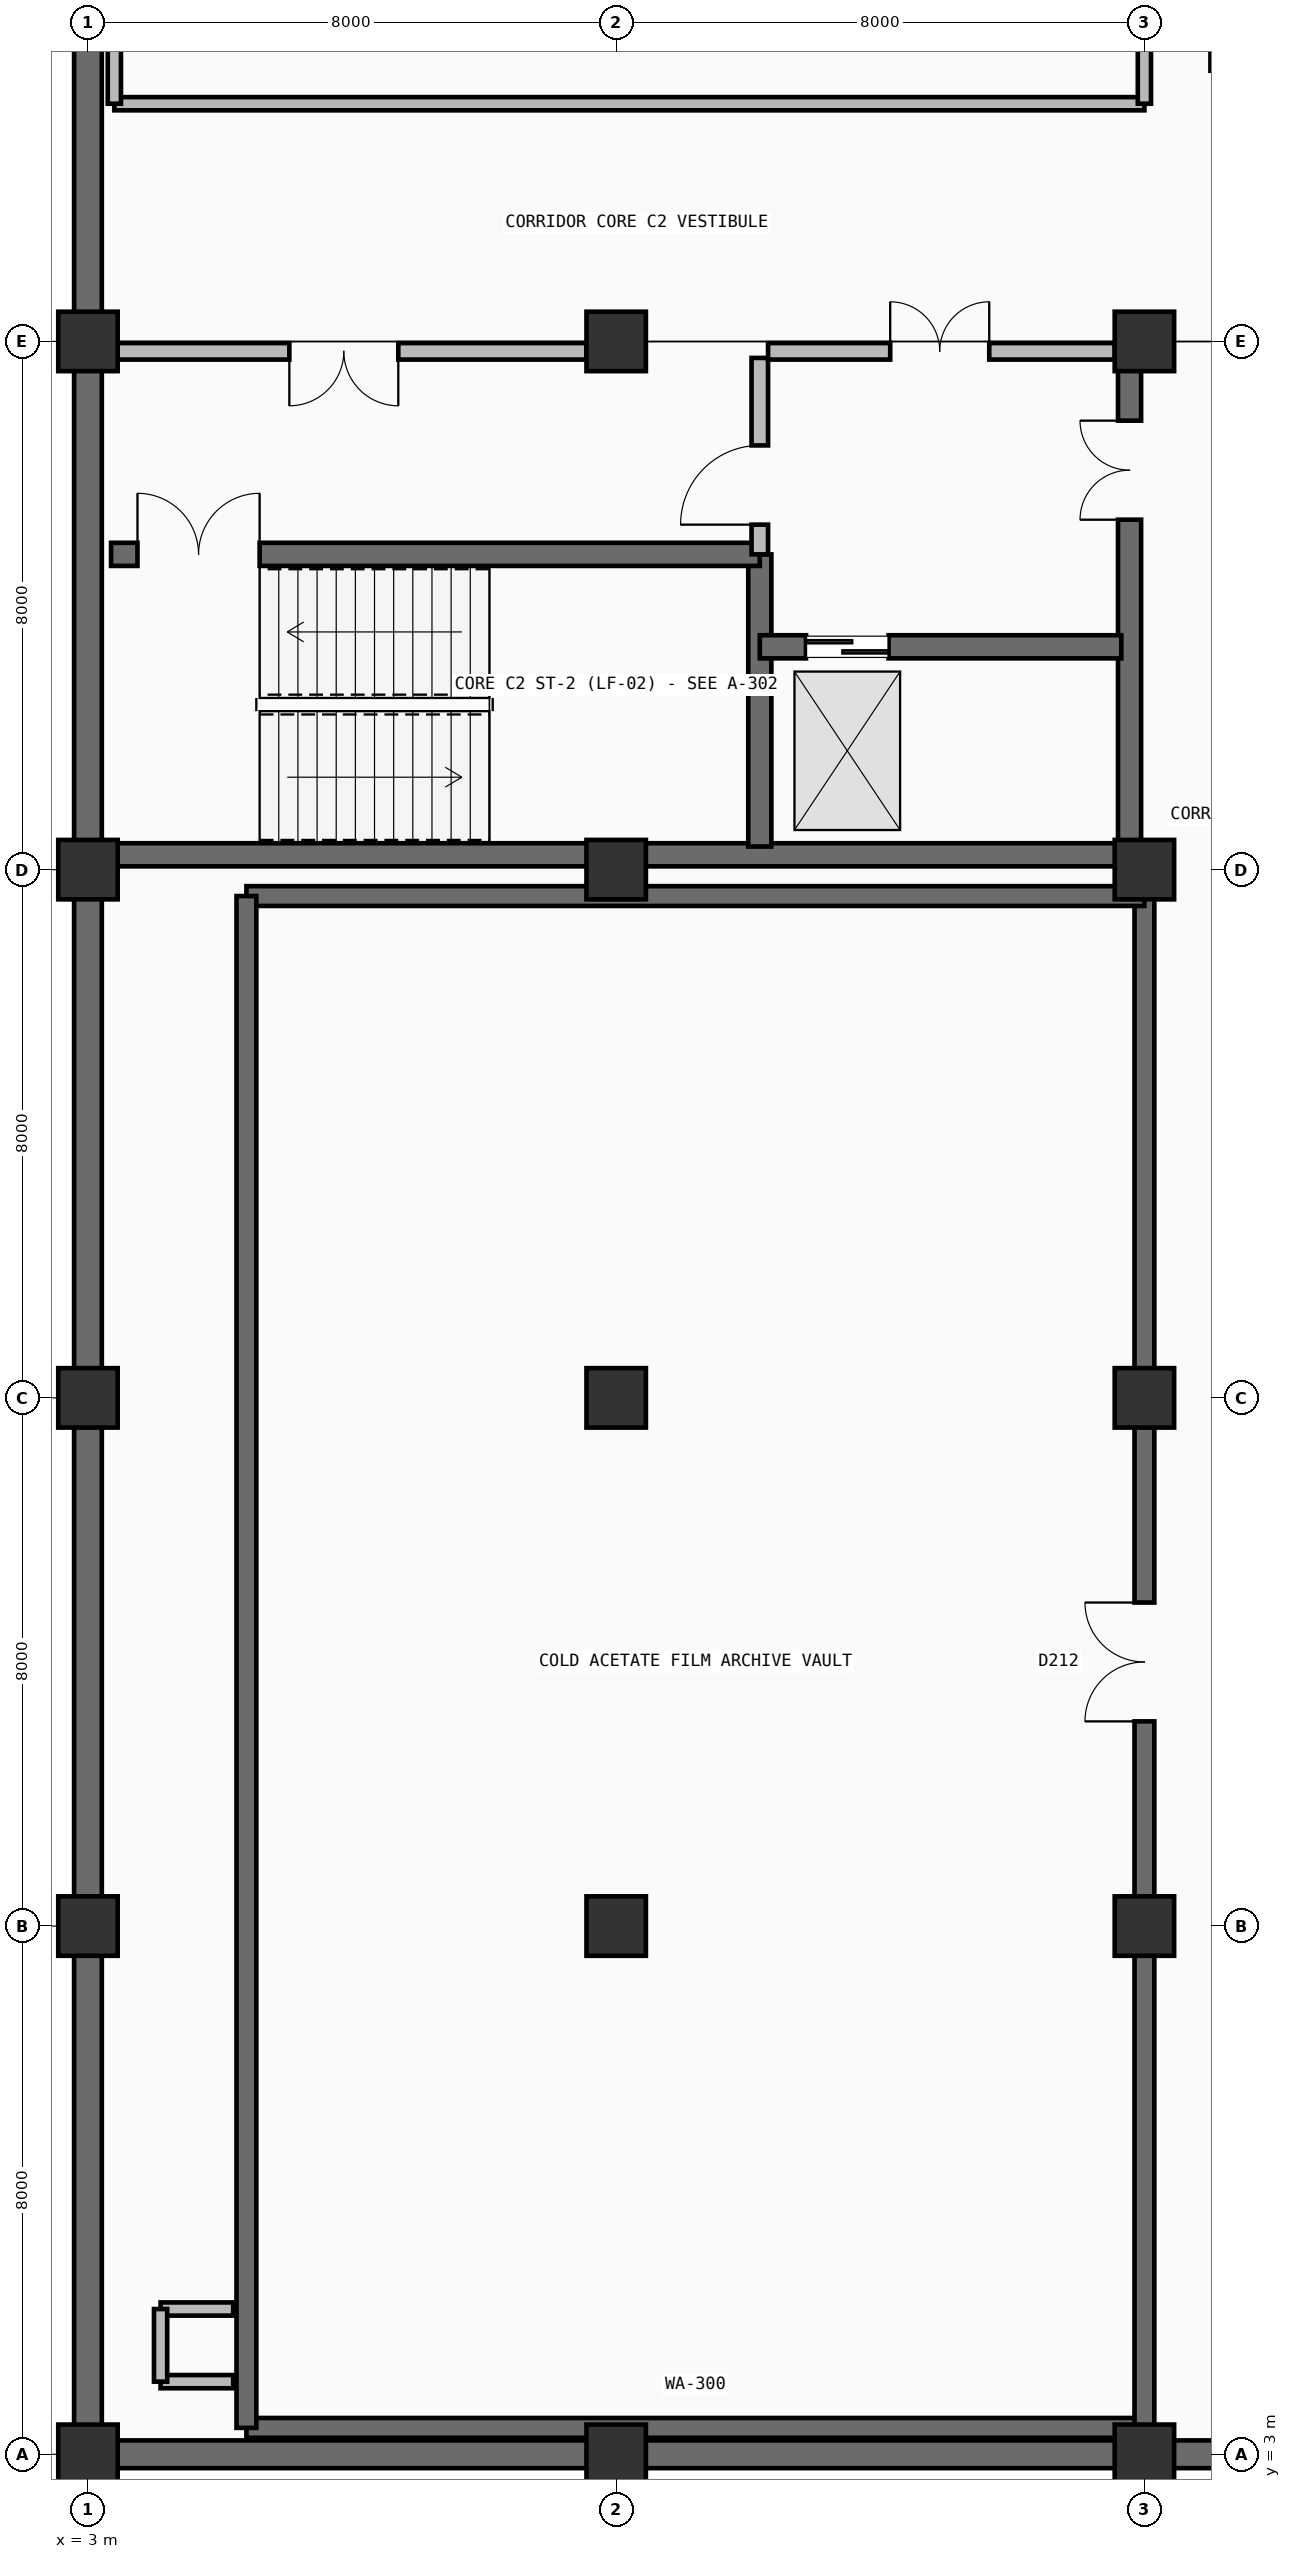
"""IFC4 building model, lengths in metres.
Left out: names, types, materials, properties, quantities, classifications, styles, units other than length and angle.
Written with IfcOpenShell. Run it as: python <this file> out.ifc"""

import sys

from ifc_helpers import new_model, si_unit, direction, frame, frame_2d, origin, origin_2d, place, context, subcontext, project, spatial, rectangle, extrude, element, fill, save


model = new_model("IFC4")
c1 = context("Model", 3, precision=1e-05, world=origin(), true_north=direction((0.0, 1.0)))
c2 = subcontext(c1, "Body", "Model", "MODEL_VIEW")
j1 = project(units=[si_unit("LENGTHUNIT", "METRE"), si_unit("PLANEANGLEUNIT", "RADIAN")], contexts=[c1])
p1 = place(None, origin())
s1 = spatial("IfcSite", under=j1, at=p1, CompositionType="ELEMENT")
p2 = place(p1, origin())
s2 = spatial("IfcBuilding", under=s1, at=p2, CompositionType="ELEMENT")
p3 = place(p2, frame((0.0, 0.0, -4.5)))
s3 = spatial("IfcBuildingStorey", under=s2, at=p3, CompositionType="ELEMENT", Elevation=-4.5)
for number, where, z_axis, x_axis in (
    (1, (3.0, 3.0, -0.6), (0.0, 0.0, 1.0), (1.0, 0.0, 0.0)),
    (2, (3.0, 11.0, -0.6), (0.0, 0.0, 1.0), (1.0, 0.0, 0.0)),
    (3, (3.0, 19.0, -0.6), (0.0, 0.0, 1.0), (1.0, 0.0, 0.0)),
    (4, (3.0, 27.0, -0.6), (0.0, 0.0, 1.0), (1.0, 0.0, 0.0)),
    (5, (3.0, 35.0, -0.6), (0.0, 0.0, 1.0), (1.0, 0.0, 0.0)),
    (6, (11.0, 3.0, -0.6), (0.0, 0.0, 1.0), (1.0, 0.0, 0.0)),
    (7, (11.0, 11.0, -0.6), (0.0, 0.0, 1.0), (1.0, 0.0, 0.0)),
    (8, (11.0, 19.0, -0.6), (0.0, 0.0, 1.0), (1.0, 0.0, 0.0)),
    (9, (11.0, 27.0, -0.6), (0.0, 0.0, 1.0), (1.0, 0.0, 0.0)),
    (10, (11.0, 35.0, -0.6), (0.0, 0.0, 1.0), (1.0, 0.0, 0.0)),
    (11, (19.0, 3.0, -0.6), (0.0, 0.0, 1.0), (1.0, 0.0, 0.0)),
    (12, (19.0, 11.0, -0.6), (0.0, 0.0, 1.0), (1.0, 0.0, 0.0)),
    (13, (19.0, 19.0, -0.6), (0.0, 0.0, 1.0), (1.0, 0.0, 0.0)),
    (14, (19.0, 27.0, -0.6), (0.0, 0.0, 1.0), (1.0, 0.0, 0.0)),
    (15, (19.0, 35.0, -0.6), (0.0, 0.0, 1.0), (1.0, 0.0, 0.0)),
):
    element("IfcColumn", number, at=place(p3, frame(where, z_axis=z_axis, x_axis=x_axis)), inside=s3, PredefinedType="COLUMN", context=c2, shape_type="SweptSolid", body=[
        extrude(rectangle(XDim=0.9, YDim=0.9, at=origin_2d()), origin(), (0.0, 0.0, 1.0), 5.1),
    ])
for number, where, z_axis, x_axis in (
    (16, (27.0, 3.0, 0.0), (0.0, 0.0, 1.0), (-1.0, 0.0, 0.0)),
    (17, (19.0, 3.0, 0.0), (0.0, 0.0, 1.0), (-1.0, 0.0, 0.0)),
    (18, (11.0, 3.0, 0.0), (0.0, 0.0, 1.0), (-1.0, 0.0, 0.0)),
    (19, (3.0, 3.0, 0.0), (0.0, 0.0, 1.0), (0.0, 1.0, 0.0)),
    (20, (3.0, 11.0, 0.0), (0.0, 0.0, 1.0), (0.0, 1.0, 0.0)),
    (21, (3.0, 19.0, 0.0), (0.0, 0.0, 1.0), (0.0, 1.0, 0.0)),
    (22, (3.0, 27.0, 0.0), (0.0, 0.0, 1.0), (0.0, 1.0, 0.0)),
    (23, (3.0, 35.0, 0.0), (0.0, 0.0, 1.0), (0.0, 1.0, 0.0)),
):
    element("IfcWall", number, at=place(p3, frame(where, z_axis=z_axis, x_axis=x_axis)), inside=s3, PredefinedType="USERDEFINED", context=c2, shape_type="SweptSolid", body=[
        extrude(rectangle(XDim=8.0, YDim=0.42, at=frame_2d((4.0, 0.0))), origin(), (0.0, 0.0, 1.0), 4.5),
    ])
p4 = place(p3, frame((3.2, 27.225, 0.0), z_axis=(0.0, 0.0, 1.0), x_axis=(1.0, 0.0, 0.0)))
e24 = element("IfcWall", 24, at=p4, inside=s3, PredefinedType="SHEAR", context=c2, shape_type="SweptSolid", body=[
    extrude(rectangle(XDim=15.6, YDim=0.35, at=frame_2d((7.8, 0.0))), origin(), (0.0, 0.0, 1.0), 4.2),
])
p5 = place(p3, frame((13.175, 27.35, 0.0), z_axis=(0.0, 0.0, 1.0), x_axis=(0.0, 1.0, 0.0)))
e25 = element("IfcWall", 25, at=p5, inside=s3, PredefinedType="SHEAR", context=c2, shape_type="SweptSolid", body=[
    extrude(rectangle(XDim=4.425, YDim=0.35, at=frame_2d((2.212, 0.0))), origin(), (0.0, 0.0, 1.0), 4.2),
])
p6 = place(p3, frame((18.775, 27.2, 0.0), z_axis=(0.0, 0.0, 1.0), x_axis=(0.0, 1.0, 0.0)))
e26 = element("IfcWall", 26, at=p6, inside=s3, PredefinedType="SHEAR", context=c2, shape_type="SweptSolid", body=[
    extrude(rectangle(XDim=7.6, YDim=0.35, at=frame_2d((3.8, 0.0))), origin(), (0.0, 0.0, 1.0), 4.2),
])
p7 = place(p6, frame((5.1, 0.0, 0.0)))
e27 = element("IfcOpeningElement", 27, at=p7, cuts=e26, PredefinedType="OPENING", context=c2, shape_type="SweptSolid", body=[
    extrude(rectangle(XDim=1.5, YDim=2.2, at=frame_2d((0.75, 1.1))), frame((0.0, 0.185, 0.0), z_axis=(0.0, -1.0, 0.0), x_axis=(1.0, 0.0, 0.0)), (0.0, 0.0, 1.0), 0.37),
])
p8 = place(p3, frame((3.35, 31.775, 0.0), z_axis=(0.0, 0.0, 1.0), x_axis=(1.0, 0.0, 0.0)))
e28 = element("IfcWall", 28, at=p8, inside=s3, PredefinedType="SHEAR", context=c2, shape_type="SweptSolid", body=[
    extrude(rectangle(XDim=9.825, YDim=0.35, at=frame_2d((4.913, 0.0))), origin(), (0.0, 0.0, 1.0), 4.2),
])
p9 = place(p8, frame((0.4, 0.0, 0.0)))
e29 = element("IfcOpeningElement", 29, at=p9, cuts=e28, PredefinedType="OPENING", context=c2, shape_type="SweptSolid", body=[
    extrude(rectangle(XDim=1.85, YDim=2.25, at=frame_2d((0.925, 1.125))), frame((0.0, 0.185, 0.0), z_axis=(0.0, -1.0, 0.0), x_axis=(1.0, 0.0, 0.0)), (0.0, 0.0, 1.0), 0.37),
])
p10 = place(p3, frame((13.175, 30.375, 0.0), z_axis=(0.0, 0.0, 1.0), x_axis=(1.0, 0.0, 0.0)))
e30 = element("IfcWall", 30, at=p10, inside=s3, PredefinedType="SHEAR", context=c2, shape_type="SweptSolid", body=[
    extrude(rectangle(XDim=5.475, YDim=0.35, at=frame_2d((2.737, 0.0))), origin(), (0.0, 0.0, 1.0), 4.2),
])
p11 = place(p10, frame((0.7, 0.0, 0.0)))
e31 = element("IfcOpeningElement", 31, at=p11, cuts=e30, PredefinedType="OPENING", context=c2, shape_type="SweptSolid", body=[
    extrude(rectangle(XDim=1.25, YDim=2.25, at=frame_2d((0.625, 1.125))), frame((0.0, 0.185, 0.0), z_axis=(0.0, -1.0, 0.0), x_axis=(1.0, 0.0, 0.0)), (0.0, 0.0, 1.0), 0.37),
])
p12 = place(p3, frame((13.175, 31.775, 0.0), z_axis=(0.0, 0.0, 1.0), x_axis=(0.0, 1.0, 0.0)))
e32 = element("IfcWall", 32, at=p12, inside=s3, PredefinedType="PARTITIONING", context=c2, shape_type="SweptSolid", body=[
    extrude(rectangle(XDim=2.975, YDim=0.25, at=frame_2d((1.488, 0.0))), origin(), (0.0, 0.0, 1.0), 4.2),
])
p13 = place(p12, frame((0.45, 0.0, 0.0)))
e33 = element("IfcOpeningElement", 33, at=p13, cuts=e32, PredefinedType="OPENING", context=c2, shape_type="SweptSolid", body=[
    extrude(rectangle(XDim=1.2, YDim=2.2, at=frame_2d((0.6, 1.1))), frame((0.0, 0.135, 0.0), z_axis=(0.0, -1.0, 0.0), x_axis=(1.0, 0.0, 0.0)), (0.0, 0.0, 1.0), 0.27),
])
p14 = place(p3, frame((3.45, 34.85, 0.0), z_axis=(0.0, 0.0, 1.0), x_axis=(1.0, 0.0, 0.0)))
e34 = element("IfcWall", 34, at=p14, inside=s3, PredefinedType="PARTITIONING", context=c2, shape_type="SweptSolid", body=[
    extrude(rectangle(XDim=7.1, YDim=0.25, at=frame_2d((3.55, 0.0))), origin(), (0.0, 0.0, 1.0), 3.435),
])
p15 = place(p14, frame((2.6, 0.0, 0.0)))
e35 = element("IfcOpeningElement", 35, at=p15, cuts=e34, PredefinedType="OPENING", context=c2, shape_type="SweptSolid", body=[
    extrude(rectangle(XDim=1.65, YDim=2.25, at=frame_2d((0.825, 1.125))), frame((0.0, 0.135, 0.0), z_axis=(0.0, -1.0, 0.0), x_axis=(1.0, 0.0, 0.0)), (0.0, 0.0, 1.0), 0.27),
])
p16 = place(p3, frame((13.3, 34.85, 0.0), z_axis=(0.0, 0.0, 1.0), x_axis=(1.0, 0.0, 0.0)))
e36 = element("IfcWall", 36, at=p16, inside=s3, PredefinedType="PARTITIONING", context=c2, shape_type="SweptSolid", body=[
    extrude(rectangle(XDim=5.25, YDim=0.25, at=frame_2d((2.625, 0.0))), origin(), (0.0, 0.0, 1.0), 3.435),
])
p17 = place(p16, frame((1.85, 0.0, 0.0)))
e37 = element("IfcOpeningElement", 37, at=p17, cuts=e36, PredefinedType="OPENING", context=c2, shape_type="SweptSolid", body=[
    extrude(rectangle(XDim=1.5, YDim=2.2, at=frame_2d((0.75, 1.1))), frame((0.0, 0.135, 0.0), z_axis=(0.0, -1.0, 0.0), x_axis=(1.0, 0.0, 0.0)), (0.0, 0.0, 1.0), 0.27),
])
p18 = place(p3, frame((5.4, 3.4, 0.0), z_axis=(0.0, 0.0, 1.0), x_axis=(1.0, 0.0, 0.0)))
e38 = element("IfcWall", 38, at=p18, inside=s3, PredefinedType="SHEAR", context=c2, shape_type="SweptSolid", body=[
    extrude(rectangle(XDim=13.6, YDim=0.3, at=frame_2d((6.8, 0.0))), origin(), (0.0, 0.0, 1.0), 4.2),
])
p19 = place(p3, frame((19.0, 3.4, 0.0), z_axis=(0.0, 0.0, 1.0), x_axis=(0.0, 1.0, 0.0)))
e39 = element("IfcWall", 39, at=p19, inside=s3, PredefinedType="SHEAR", context=c2, shape_type="SweptSolid", body=[
    extrude(rectangle(XDim=23.2, YDim=0.3, at=frame_2d((11.6, 0.0))), origin(), (0.0, 0.0, 1.0), 4.2),
])
p20 = place(p19, frame((10.7, 0.0, 0.0)))
e40 = element("IfcOpeningElement", 40, at=p20, cuts=e39, PredefinedType="OPENING", context=c2, shape_type="SweptSolid", body=[
    extrude(rectangle(XDim=1.8, YDim=2.3, at=frame_2d((0.9, 1.15))), frame((0.0, 0.16, 0.0), z_axis=(0.0, -1.0, 0.0), x_axis=(1.0, 0.0, 0.0)), (0.0, 0.0, 1.0), 0.32),
])
p21 = place(p3, frame((5.4, 26.6, 0.0), z_axis=(0.0, 0.0, 1.0), x_axis=(1.0, 0.0, 0.0)))
e41 = element("IfcWall", 41, at=p21, inside=s3, PredefinedType="SHEAR", context=c2, shape_type="SweptSolid", body=[
    extrude(rectangle(XDim=13.6, YDim=0.3, at=frame_2d((6.8, 0.0))), origin(), (0.0, 0.0, 1.0), 4.2),
])
p22 = place(p3, frame((5.4, 3.4, 0.0), z_axis=(0.0, 0.0, 1.0), x_axis=(0.0, 1.0, 0.0)))
e42 = element("IfcWall", 42, at=p22, inside=s3, PredefinedType="SHEAR", context=c2, shape_type="SweptSolid", body=[
    extrude(rectangle(XDim=23.2, YDim=0.3, at=frame_2d((11.6, 0.0))), origin(), (0.0, 0.0, 1.0), 4.2),
])
p23 = place(p3, frame((3.4, 38.6, 0.0), z_axis=(0.0, 0.0, 1.0), x_axis=(1.0, 0.0, 0.0)))
e43 = element("IfcWall", 43, at=p23, inside=s3, PredefinedType="PARTITIONING", context=c2, shape_type="SweptSolid", body=[
    extrude(rectangle(XDim=15.6, YDim=0.2, at=frame_2d((7.8, 0.0))), origin(), (0.0, 0.0, 1.0), 4.2),
])
p24 = place(p3, frame((19.0, 38.6, 0.0), z_axis=(0.0, 0.0, 1.0), x_axis=(0.0, 1.0, 0.0)))
e44 = element("IfcWall", 44, at=p24, inside=s3, PredefinedType="PARTITIONING", context=c2, shape_type="SweptSolid", body=[
    extrude(rectangle(XDim=25.0, YDim=0.2, at=frame_2d((12.5, 0.0))), origin(), (0.0, 0.0, 1.0), 3.485),
])
p25 = place(p24, frame((15.601, 0.0, 0.0)))
e45 = element("IfcOpeningElement", 45, at=p25, cuts=e44, PredefinedType="OPENING", context=c2, shape_type="SweptSolid", body=[
    extrude(rectangle(XDim=1.65, YDim=2.25, at=frame_2d((0.825, 1.125))), frame((0.0, 0.11, 0.0), z_axis=(0.0, -1.0, 0.0), x_axis=(1.0, 0.0, 0.0)), (0.0, 0.0, 1.0), 0.22),
])
p26 = place(p3, frame((3.4, 38.6, 0.0), z_axis=(0.0, 0.0, 1.0), x_axis=(0.0, 1.0, 0.0)))
e46 = element("IfcWall", 46, at=p26, inside=s3, PredefinedType="PARTITIONING", context=c2, shape_type="SweptSolid", body=[
    extrude(rectangle(XDim=25.0, YDim=0.2, at=frame_2d((12.5, 0.0))), origin(), (0.0, 0.0, 1.0), 3.505),
])
for number, where, z_axis, x_axis in (
    (47, (4.1, 4.1, 0.0), (0.0, 0.0, 1.0), (1.0, 0.0, 0.0)),
    (48, (4.1, 5.2, 0.0), (0.0, 0.0, 1.0), (1.0, 0.0, 0.0)),
    (49, (4.1, 4.1, 0.0), (0.0, 0.0, 1.0), (0.0, 1.0, 0.0)),
):
    element("IfcWall", number, at=place(p3, frame(where, z_axis=z_axis, x_axis=x_axis)), inside=s3, PredefinedType="PARTITIONING", context=c2, shape_type="SweptSolid", body=[
        extrude(rectangle(XDim=1.1, YDim=0.2, at=frame_2d((0.55, 0.0))), origin(), (0.0, 0.0, 1.0), 4.2),
    ])
p27 = place(p9, origin())
e50 = element("IfcDoor", 50, at=p27, inside=s3, OperationType="DOUBLE_DOOR_SINGLE_SWING", PredefinedType="DOOR", context=c2, shape_type="SweptSolid", body=[
    extrude(rectangle(XDim=1.85, YDim=2.25, at=frame_2d((0.925, 1.125))), frame((0.0, 0.025, 0.0), z_axis=(0.0, -1.0, 0.0), x_axis=(1.0, 0.0, 0.0)), (0.0, 0.0, 1.0), 0.05),
])
fill(e29, e50)
p28 = place(p11, origin())
e51 = element("IfcDoor", 51, at=p28, inside=s3, OperationType="DOUBLE_DOOR_SLIDING", PredefinedType="DOOR", context=c2, shape_type="SweptSolid", body=[
    extrude(rectangle(XDim=1.25, YDim=2.25, at=frame_2d((0.625, 1.125))), frame((0.0, 0.025, 0.0), z_axis=(0.0, -1.0, 0.0), x_axis=(1.0, 0.0, 0.0)), (0.0, 0.0, 1.0), 0.05),
])
fill(e31, e51)
p29 = place(p13, origin())
e52 = element("IfcDoor", 52, at=p29, inside=s3, OperationType="SINGLE_SWING_LEFT", PredefinedType="DOOR", context=c2, shape_type="SweptSolid", body=[
    extrude(rectangle(XDim=1.2, YDim=2.2, at=frame_2d((0.6, 1.1))), frame((0.0, 0.025, 0.0), z_axis=(0.0, -1.0, 0.0), x_axis=(1.0, 0.0, 0.0)), (0.0, 0.0, 1.0), 0.05),
])
fill(e33, e52)
p30 = place(p15, frame((1.65, 0.0, 0.0), z_axis=(0.0, 0.0, 1.0), x_axis=(-1.0, 0.0, 0.0)))
e53 = element("IfcDoor", 53, at=p30, inside=s3, OperationType="DOUBLE_DOOR_SINGLE_SWING", PredefinedType="DOOR", context=c2, shape_type="SweptSolid", body=[
    extrude(rectangle(XDim=1.65, YDim=2.25, at=frame_2d((0.825, 1.125))), frame((0.0, 0.025, 0.0), z_axis=(0.0, -1.0, 0.0), x_axis=(1.0, 0.0, 0.0)), (0.0, 0.0, 1.0), 0.05),
])
fill(e35, e53)
p31 = place(p17, origin())
e54 = element("IfcDoor", 54, at=p31, inside=s3, OperationType="DOUBLE_DOOR_SINGLE_SWING", PredefinedType="DOOR", context=c2, shape_type="SweptSolid", body=[
    extrude(rectangle(XDim=1.5, YDim=2.2, at=frame_2d((0.75, 1.1))), frame((0.0, 0.025, 0.0), z_axis=(0.0, -1.0, 0.0), x_axis=(1.0, 0.0, 0.0)), (0.0, 0.0, 1.0), 0.05),
])
fill(e37, e54)
p32 = place(p7, origin())
e55 = element("IfcDoor", 55, at=p32, inside=s3, OperationType="DOUBLE_DOOR_SINGLE_SWING", PredefinedType="DOOR", context=c2, shape_type="SweptSolid", body=[
    extrude(rectangle(XDim=1.5, YDim=2.2, at=frame_2d((0.75, 1.1))), frame((0.0, 0.025, 0.0), z_axis=(0.0, -1.0, 0.0), x_axis=(1.0, 0.0, 0.0)), (0.0, 0.0, 1.0), 0.05),
])
fill(e27, e55)
p33 = place(p20, origin())
e56 = element("IfcDoor", 56, at=p33, inside=s3, OperationType="DOUBLE_DOOR_SINGLE_SWING", PredefinedType="DOOR", context=c2, shape_type="SweptSolid", body=[
    extrude(rectangle(XDim=1.8, YDim=2.3, at=frame_2d((0.9, 1.15))), frame((0.0, 0.025, 0.0), z_axis=(0.0, -1.0, 0.0), x_axis=(1.0, 0.0, 0.0)), (0.0, 0.0, 1.0), 0.05),
])
fill(e40, e56)
save(model, sys.argv[1])
